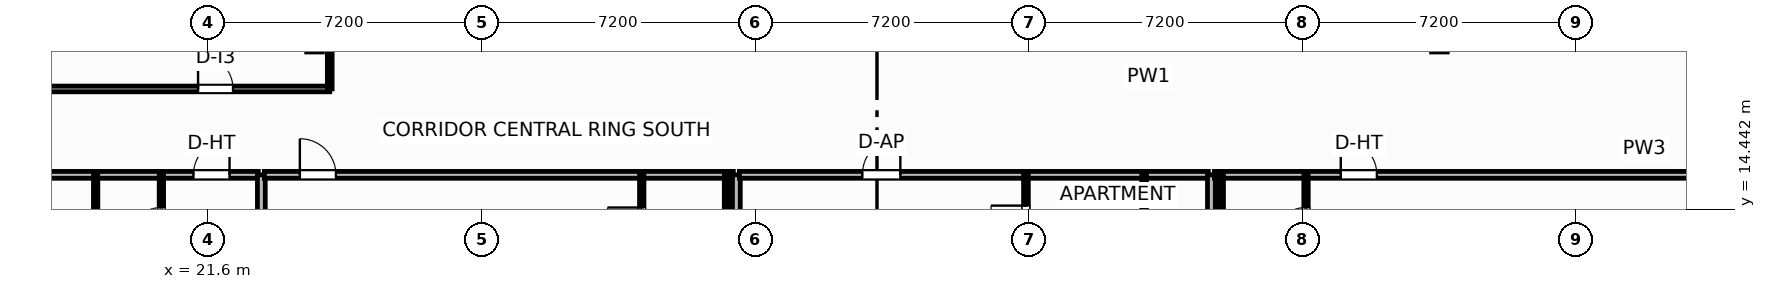
"""IFC4 building model, lengths in metres.
Left out: names, types, materials, properties, quantities, classifications, styles, units other than length and angle.
Written with IfcOpenShell. Run it as: python <this file> out.ifc"""

import sys

from ifc_helpers import new_model, si_unit, direction, frame, frame_2d, origin, place, context, subcontext, project, spatial, rectangle, extrude, element, fill, save


model = new_model("IFC4")
c1 = context("Model", 3, precision=1e-05, world=origin(), true_north=direction((0.0, 1.0)))
c2 = subcontext(c1, "Body", "Model", "MODEL_VIEW")
j1 = project(units=[si_unit("LENGTHUNIT", "METRE"), si_unit("PLANEANGLEUNIT", "RADIAN")], contexts=[c1])
p1 = place(None, origin())
s1 = spatial("IfcSite", under=j1, at=p1, CompositionType="ELEMENT")
p2 = place(p1, origin())
s2 = spatial("IfcBuilding", under=s1, at=p2, CompositionType="ELEMENT")
p3 = place(p2, frame((0.0, 0.0, 231.2)))
s3 = spatial("IfcBuildingStorey", under=s2, at=p3, CompositionType="ELEMENT", Elevation=231.2)
p4 = place(p3, frame((56.219, 9.845, 0.0), z_axis=(0.0, 0.0, 1.0), x_axis=(0.935225601791, 0.354052360188, 0.0)))
e1 = element("IfcWall", 1, at=p4, inside=s3, PredefinedType="SOLIDWALL", context=c2, shape_type="SweptSolid", body=[
    extrude(rectangle(XDim=17.647, YDim=0.22, at=frame_2d((8.824, 0.0))), origin(), (0.0, 0.0, 1.0), 2.73),
])
p5 = place(p4, frame((7.774, 0.0, 0.8)))
e2 = element("IfcOpeningElement", 2, at=p5, cuts=e1, PredefinedType="OPENING", context=c2, shape_type="SweptSolid", body=[
    extrude(rectangle(XDim=2.1, YDim=1.75, at=frame_2d((1.05, 0.875))), frame((0.0, 0.12, 0.0), z_axis=(0.0, -1.0, 0.0), x_axis=(1.0, 0.0, 0.0)), (0.0, 0.0, 1.0), 0.24),
])
p6 = place(p3, frame((6.908, 17.61, 0.0), z_axis=(0.0, 0.0, 1.0), x_axis=(1.0, 0.0, 0.0)))
e3 = element("IfcWall", 3, at=p6, inside=s3, PredefinedType="PARTITIONING", context=c2, shape_type="SweptSolid", body=[
    extrude(rectangle(XDim=17.892, YDim=0.15, at=frame_2d((8.946, 0.0))), origin(), (0.0, 0.0, 1.0), 3.45),
])
p7 = place(p6, frame((14.427, 0.0, 0.0)))
e4 = element("IfcOpeningElement", 4, at=p7, cuts=e3, PredefinedType="OPENING", context=c2, shape_type="SweptSolid", body=[
    extrude(rectangle(XDim=0.92, YDim=2.05, at=frame_2d((0.46, 1.025))), frame((0.0, 0.085, 0.0), z_axis=(0.0, -1.0, 0.0), x_axis=(1.0, 0.0, 0.0)), (0.0, 0.0, 1.0), 0.17),
])
p8 = place(p3, frame((24.8, 17.61, 0.0), z_axis=(0.0, 0.0, 1.0), x_axis=(0.0, 1.0, 0.0)))
e5 = element("IfcWall", 5, at=p8, inside=s3, PredefinedType="PARTITIONING", context=c2, shape_type="SweptSolid", body=[
    extrude(rectangle(XDim=1.63, YDim=0.125, at=frame_2d((0.815, 0.0))), origin(), (0.0, 0.0, 1.0), 2.739),
])
p9 = place(p3, frame((7.764, 15.35, 0.0), z_axis=(0.0, 0.0, 1.0), x_axis=(1.0, 0.0, 0.0)))
e6 = element("IfcWall", 6, at=p9, inside=s3, PredefinedType="PARTITIONING", context=c2, shape_type="SweptSolid", body=[
    extrude(rectangle(XDim=15.156, YDim=0.18, at=frame_2d((7.578, 0.0))), origin(), (0.0, 0.0, 1.0), 3.45),
])
p10 = place(p9, frame((13.45, 0.0, 0.0)))
e7 = element("IfcOpeningElement", 7, at=p10, cuts=e6, PredefinedType="OPENING", context=c2, shape_type="SweptSolid", body=[
    extrude(rectangle(XDim=0.95, YDim=2.15, at=frame_2d((0.475, 1.075))), frame((0.0, 0.1, 0.0), z_axis=(0.0, -1.0, 0.0), x_axis=(1.0, 0.0, 0.0)), (0.0, 0.0, 1.0), 0.2),
])
p11 = place(p3, frame((20.37, 12.83, 0.0), z_axis=(0.0, 0.0, 1.0), x_axis=(0.0, 1.0, 0.0)))
e8 = element("IfcWall", 8, at=p11, inside=s3, PredefinedType="PARTITIONING", context=c2, shape_type="SweptSolid", body=[
    extrude(rectangle(XDim=2.52, YDim=0.115, at=frame_2d((1.26, 0.0))), origin(), (0.0, 0.0, 1.0), 3.45),
])
p12 = place(p11, frame((0.76, 0.0, 0.0)))
e9 = element("IfcOpeningElement", 9, at=p12, cuts=e8, PredefinedType="OPENING", context=c2, shape_type="SweptSolid", body=[
    extrude(rectangle(XDim=0.9, YDim=2.05, at=frame_2d((0.45, 1.025))), frame((0.0, 0.067, 0.0), z_axis=(0.0, -1.0, 0.0), x_axis=(1.0, 0.0, 0.0)), (0.0, 0.0, 1.0), 0.135),
])
p13 = place(p3, frame((18.64, 12.83, 0.0), z_axis=(0.0, 0.0, 1.0), x_axis=(0.0, 1.0, 0.0)))
e10 = element("IfcWall", 10, at=p13, inside=s3, PredefinedType="PARTITIONING", context=c2, shape_type="SweptSolid", body=[
    extrude(rectangle(XDim=2.52, YDim=0.115, at=frame_2d((1.26, 0.0))), origin(), (0.0, 0.0, 1.0), 3.45),
])
p14 = place(p3, frame((23.0, -2.71, 0.0), z_axis=(0.0, 0.0, 1.0), x_axis=(0.0, 1.0, 0.0)))
e11 = element("IfcWall", 11, at=p14, inside=s3, PredefinedType="PARTITIONING", context=c2, shape_type="SweptSolid", body=[
    extrude(rectangle(XDim=18.06, YDim=0.205, at=frame_2d((9.03, 0.0))), origin(), (0.0, 0.0, 1.0), 3.45),
])
p15 = place(p3, frame((23.08, 15.35, 0.0), z_axis=(0.0, 0.0, 1.0), x_axis=(1.0, 0.0, 0.0)))
e12 = element("IfcWall", 12, at=p15, inside=s3, PredefinedType="PARTITIONING", context=c2, shape_type="SweptSolid", body=[
    extrude(rectangle(XDim=12.34, YDim=0.18, at=frame_2d((6.17, 0.0))), origin(), (0.0, 0.0, 1.0), 3.45),
])
p16 = place(p15, frame((0.933, 0.0, 0.0)))
e13 = element("IfcOpeningElement", 13, at=p16, cuts=e12, PredefinedType="OPENING", context=c2, shape_type="SweptSolid", body=[
    extrude(rectangle(XDim=0.95, YDim=2.15, at=frame_2d((0.475, 1.075))), frame((0.0, 0.1, 0.0), z_axis=(0.0, -1.0, 0.0), x_axis=(1.0, 0.0, 0.0)), (0.0, 0.0, 1.0), 0.2),
])
p17 = place(p3, frame((33.01, 12.83, 0.0), z_axis=(0.0, 0.0, 1.0), x_axis=(0.0, 1.0, 0.0)))
e14 = element("IfcWall", 14, at=p17, inside=s3, PredefinedType="PARTITIONING", context=c2, shape_type="SweptSolid", body=[
    extrude(rectangle(XDim=2.52, YDim=0.115, at=frame_2d((1.26, 0.0))), origin(), (0.0, 0.0, 1.0), 3.45),
])
p18 = place(p17, frame((0.76, 0.0, 0.0)))
e15 = element("IfcOpeningElement", 15, at=p18, cuts=e14, PredefinedType="OPENING", context=c2, shape_type="SweptSolid", body=[
    extrude(rectangle(XDim=0.9, YDim=2.05, at=frame_2d((0.45, 1.025))), frame((0.0, 0.067, 0.0), z_axis=(0.0, -1.0, 0.0), x_axis=(1.0, 0.0, 0.0)), (0.0, 0.0, 1.0), 0.135),
])
p19 = place(p3, frame((35.24, 12.83, 0.0), z_axis=(0.0, 0.0, 1.0), x_axis=(0.0, 1.0, 0.0)))
e16 = element("IfcWall", 16, at=p19, inside=s3, PredefinedType="PARTITIONING", context=c2, shape_type="SweptSolid", body=[
    extrude(rectangle(XDim=2.52, YDim=0.115, at=frame_2d((1.26, 0.0))), origin(), (0.0, 0.0, 1.0), 2.739),
])
p20 = place(p3, frame((35.5, 2.022, 0.0), z_axis=(0.0, 0.0, 1.0), x_axis=(0.0, 1.0, 0.0)))
e17 = element("IfcWall", 17, at=p20, inside=s3, PredefinedType="PARTITIONING", context=c2, shape_type="SweptSolid", body=[
    extrude(rectangle(XDim=13.328, YDim=0.205, at=frame_2d((6.664, 0.0))), origin(), (0.0, 0.0, 1.0), 2.739),
])
p21 = place(p3, frame((35.58, 15.35, 0.0), z_axis=(0.0, 0.0, 1.0), x_axis=(1.0, 0.0, 0.0)))
e18 = element("IfcWall", 18, at=p21, inside=s3, PredefinedType="PARTITIONING", context=c2, shape_type="SweptSolid", body=[
    extrude(rectangle(XDim=12.34, YDim=0.18, at=frame_2d((6.17, 0.0))), origin(), (0.0, 0.0, 1.0), 3.45),
])
p22 = place(p21, frame((3.235, 0.0, 0.0)))
e19 = element("IfcOpeningElement", 19, at=p22, cuts=e18, PredefinedType="OPENING", context=c2, shape_type="SweptSolid", body=[
    extrude(rectangle(XDim=1.0, YDim=2.2, at=frame_2d((0.5, 1.1))), frame((0.0, 0.1, 0.0), z_axis=(0.0, -1.0, 0.0), x_axis=(1.0, 0.0, 0.0)), (0.0, 0.0, 1.0), 0.2),
])
p23 = place(p3, frame((43.12, 4.907, 0.0), z_axis=(0.0, 0.0, 1.0), x_axis=(0.0, 1.0, 0.0)))
e20 = element("IfcWall", 20, at=p23, inside=s3, PredefinedType="PARTITIONING", context=c2, shape_type="SweptSolid", body=[
    extrude(rectangle(XDim=10.443, YDim=0.125, at=frame_2d((5.222, 0.0))), origin(), (0.0, 0.0, 1.0), 3.45),
])
p24 = place(p23, frame((2.32, 0.0, 0.0)))
e21 = element("IfcOpeningElement", 21, at=p24, cuts=e20, PredefinedType="OPENING", context=c2, shape_type="SweptSolid", body=[
    extrude(rectangle(XDim=0.92, YDim=2.05, at=frame_2d((0.46, 1.025))), frame((0.0, 0.073, 0.0), z_axis=(0.0, -1.0, 0.0), x_axis=(1.0, 0.0, 0.0)), (0.0, 0.0, 1.0), 0.145),
])
p25 = place(p23, frame((6.42, 0.0, 0.0)))
e22 = element("IfcOpeningElement", 22, at=p25, cuts=e20, PredefinedType="OPENING", context=c2, shape_type="SweptSolid", body=[
    extrude(rectangle(XDim=0.9, YDim=2.05, at=frame_2d((0.45, 1.025))), frame((0.0, 0.073, 0.0), z_axis=(0.0, -1.0, 0.0), x_axis=(1.0, 0.0, 0.0)), (0.0, 0.0, 1.0), 0.145),
])
p26 = place(p23, frame((8.713, 0.0, 0.0)))
e23 = element("IfcOpeningElement", 23, at=p26, cuts=e20, PredefinedType="OPENING", context=c2, shape_type="SweptSolid", body=[
    extrude(rectangle(XDim=0.92, YDim=2.05, at=frame_2d((0.46, 1.025))), frame((0.0, 0.073, 0.0), z_axis=(0.0, -1.0, 0.0), x_axis=(1.0, 0.0, 0.0)), (0.0, 0.0, 1.0), 0.145),
])
p27 = place(p3, frame((46.23, 12.94, 0.0), z_axis=(0.0, 0.0, 1.0), x_axis=(0.0, 1.0, 0.0)))
e24 = element("IfcWall", 24, at=p27, inside=s3, PredefinedType="PARTITIONING", context=c2, shape_type="SweptSolid", body=[
    extrude(rectangle(XDim=2.41, YDim=0.125, at=frame_2d((1.205, 0.0))), origin(), (0.0, 0.0, 1.0), 3.45),
])
p28 = place(p3, frame((48.0, 6.754, 0.0), z_axis=(0.0, 0.0, 1.0), x_axis=(0.0, 1.0, 0.0)))
e25 = element("IfcWall", 25, at=p28, inside=s3, PredefinedType="PARTITIONING", context=c2, shape_type="SweptSolid", body=[
    extrude(rectangle(XDim=8.596, YDim=0.205, at=frame_2d((4.298, 0.0))), origin(), (0.0, 0.0, 1.0), 3.45),
])
p29 = place(p3, frame((48.08, 15.35, 0.0), z_axis=(0.0, 0.0, 1.0), x_axis=(1.0, 0.0, 0.0)))
e26 = element("IfcWall", 26, at=p29, inside=s3, PredefinedType="PARTITIONING", context=c2, shape_type="SweptSolid", body=[
    extrude(rectangle(XDim=22.624, YDim=0.18, at=frame_2d((11.312, 0.0))), origin(), (0.0, 0.0, 1.0), 3.45),
])
p30 = place(p29, frame((3.324, 0.0, 0.0)))
e27 = element("IfcOpeningElement", 27, at=p30, cuts=e26, PredefinedType="OPENING", context=c2, shape_type="SweptSolid", body=[
    extrude(rectangle(XDim=0.95, YDim=2.15, at=frame_2d((0.475, 1.075))), frame((0.0, 0.1, 0.0), z_axis=(0.0, -1.0, 0.0), x_axis=(1.0, 0.0, 0.0)), (0.0, 0.0, 1.0), 0.2),
])
p31 = place(p3, frame((50.49, 12.83, 0.0), z_axis=(0.0, 0.0, 1.0), x_axis=(0.0, 1.0, 0.0)))
e28 = element("IfcWall", 28, at=p31, inside=s3, PredefinedType="PARTITIONING", context=c2, shape_type="SweptSolid", body=[
    extrude(rectangle(XDim=2.52, YDim=0.115, at=frame_2d((1.26, 0.0))), origin(), (0.0, 0.0, 1.0), 3.45),
])
p32 = place(p31, frame((0.76, 0.0, 0.0)))
e29 = element("IfcOpeningElement", 29, at=p32, cuts=e28, PredefinedType="OPENING", context=c2, shape_type="SweptSolid", body=[
    extrude(rectangle(XDim=0.9, YDim=2.05, at=frame_2d((0.45, 1.025))), frame((0.0, 0.067, 0.0), z_axis=(0.0, -1.0, 0.0), x_axis=(1.0, 0.0, 0.0)), (0.0, 0.0, 1.0), 0.135),
])
p33 = place(p3, frame((48.26, 12.83, 0.0), z_axis=(0.0, 0.0, 1.0), x_axis=(0.0, 1.0, 0.0)))
e30 = element("IfcWall", 30, at=p33, inside=s3, PredefinedType="PARTITIONING", context=c2, shape_type="SweptSolid", body=[
    extrude(rectangle(XDim=2.52, YDim=0.115, at=frame_2d((1.26, 0.0))), origin(), (0.0, 0.0, 1.0), 3.45),
])
p34 = place(p7, origin())
e31 = element("IfcDoor", 31, at=p34, inside=s3, OperationType="SINGLE_SWING_LEFT", PredefinedType="DOOR", context=c2, shape_type="SweptSolid", body=[
    extrude(rectangle(XDim=0.92, YDim=2.05, at=frame_2d((0.46, 1.025))), frame((0.0, 0.025, 0.0), z_axis=(0.0, -1.0, 0.0), x_axis=(1.0, 0.0, 0.0)), (0.0, 0.0, 1.0), 0.05),
])
fill(e4, e31)
p35 = place(p10, origin())
e32 = element("IfcDoor", 32, at=p35, inside=s3, OperationType="SINGLE_SWING_RIGHT", PredefinedType="DOOR", context=c2, shape_type="SweptSolid", body=[
    extrude(rectangle(XDim=0.95, YDim=2.15, at=frame_2d((0.475, 1.075))), frame((0.0, 0.025, 0.0), z_axis=(0.0, -1.0, 0.0), x_axis=(1.0, 0.0, 0.0)), (0.0, 0.0, 1.0), 0.05),
])
fill(e7, e32)
p36 = place(p12, origin())
e33 = element("IfcDoor", 33, at=p36, inside=s3, OperationType="SINGLE_SWING_LEFT", PredefinedType="DOOR", context=c2, shape_type="SweptSolid", body=[
    extrude(rectangle(XDim=0.9, YDim=2.05, at=frame_2d((0.45, 1.025))), frame((0.0, 0.025, 0.0), z_axis=(0.0, -1.0, 0.0), x_axis=(1.0, 0.0, 0.0)), (0.0, 0.0, 1.0), 0.05),
])
fill(e9, e33)
p37 = place(p16, origin())
e34 = element("IfcDoor", 34, at=p37, inside=s3, OperationType="SINGLE_SWING_LEFT", PredefinedType="DOOR", context=c2, shape_type="SweptSolid", body=[
    extrude(rectangle(XDim=0.95, YDim=2.15, at=frame_2d((0.475, 1.075))), frame((0.0, 0.025, 0.0), z_axis=(0.0, -1.0, 0.0), x_axis=(1.0, 0.0, 0.0)), (0.0, 0.0, 1.0), 0.05),
])
fill(e13, e34)
p38 = place(p18, origin())
e35 = element("IfcDoor", 35, at=p38, inside=s3, OperationType="SINGLE_SWING_RIGHT", PredefinedType="DOOR", context=c2, shape_type="SweptSolid", body=[
    extrude(rectangle(XDim=0.9, YDim=2.05, at=frame_2d((0.45, 1.025))), frame((0.0, 0.025, 0.0), z_axis=(0.0, -1.0, 0.0), x_axis=(1.0, 0.0, 0.0)), (0.0, 0.0, 1.0), 0.05),
])
fill(e15, e35)
p39 = place(p22, origin())
e36 = element("IfcDoor", 36, at=p39, inside=s3, OperationType="SINGLE_SWING_RIGHT", PredefinedType="DOOR", context=c2, shape_type="SweptSolid", body=[
    extrude(rectangle(XDim=1.0, YDim=2.2, at=frame_2d((0.5, 1.1))), frame((0.0, 0.025, 0.0), z_axis=(0.0, -1.0, 0.0), x_axis=(1.0, 0.0, 0.0)), (0.0, 0.0, 1.0), 0.05),
])
fill(e19, e36)
p40 = place(p26, origin())
e37 = element("IfcDoor", 37, at=p40, inside=s3, OperationType="SINGLE_SWING_RIGHT", PredefinedType="DOOR", context=c2, shape_type="SweptSolid", body=[
    extrude(rectangle(XDim=0.92, YDim=2.05, at=frame_2d((0.46, 1.025))), frame((0.0, 0.025, 0.0), z_axis=(0.0, -1.0, 0.0), x_axis=(1.0, 0.0, 0.0)), (0.0, 0.0, 1.0), 0.05),
])
fill(e23, e37)
p41 = place(p30, origin())
e38 = element("IfcDoor", 38, at=p41, inside=s3, OperationType="SINGLE_SWING_LEFT", PredefinedType="DOOR", context=c2, shape_type="SweptSolid", body=[
    extrude(rectangle(XDim=0.95, YDim=2.15, at=frame_2d((0.475, 1.075))), frame((0.0, 0.025, 0.0), z_axis=(0.0, -1.0, 0.0), x_axis=(1.0, 0.0, 0.0)), (0.0, 0.0, 1.0), 0.05),
])
fill(e27, e38)
p42 = place(p32, origin())
e39 = element("IfcDoor", 39, at=p42, inside=s3, OperationType="SINGLE_SWING_LEFT", PredefinedType="DOOR", context=c2, shape_type="SweptSolid", body=[
    extrude(rectangle(XDim=0.9, YDim=2.05, at=frame_2d((0.45, 1.025))), frame((0.0, 0.025, 0.0), z_axis=(0.0, -1.0, 0.0), x_axis=(1.0, 0.0, 0.0)), (0.0, 0.0, 1.0), 0.05),
])
fill(e29, e39)
save(model, sys.argv[1])
